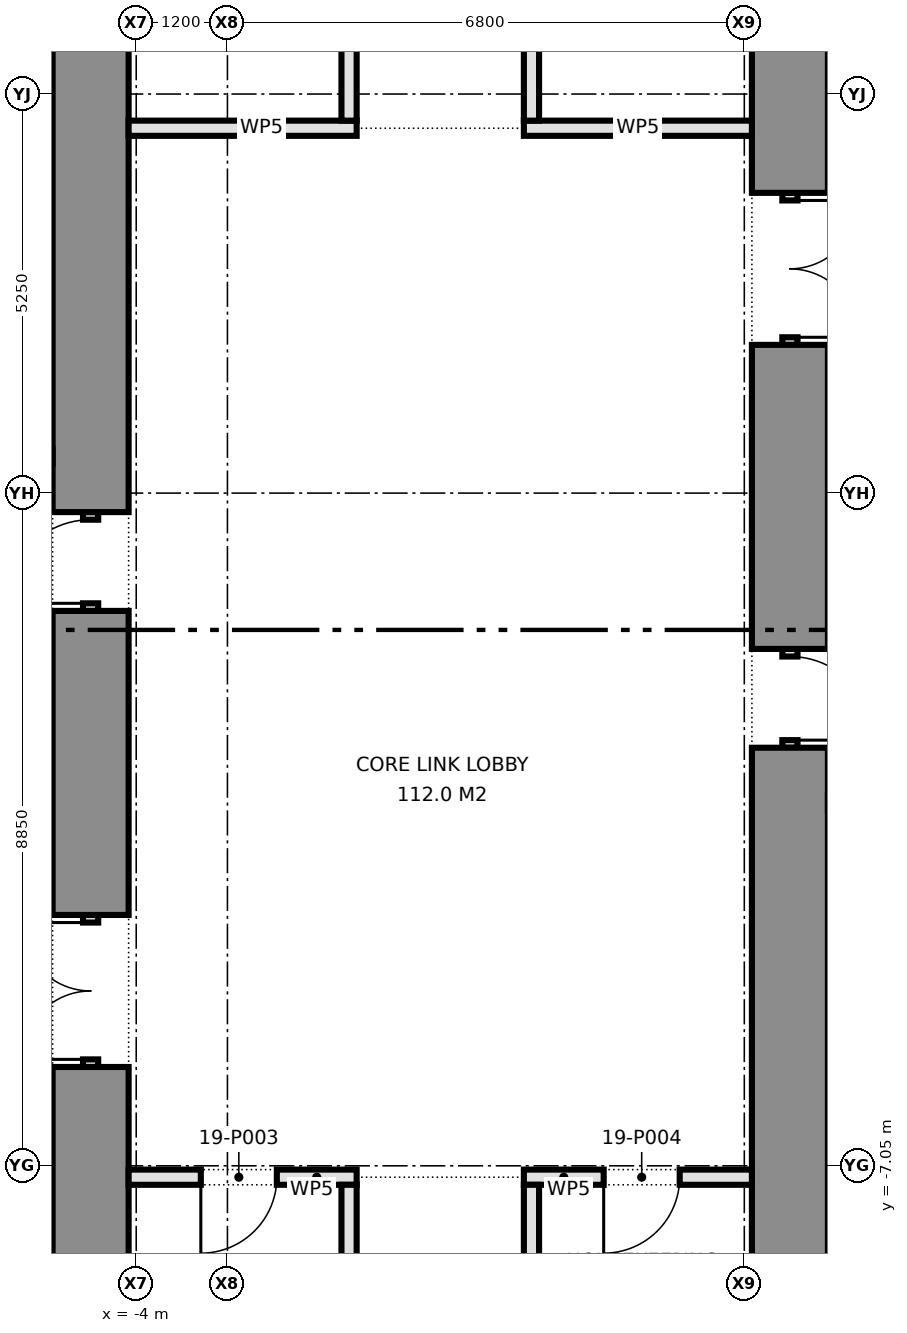
"""IFC4 building model, lengths in metres.
Left out: names, types, materials, properties, quantities, classifications, styles, units other than length and angle.
Written with IfcOpenShell. Run it as: python <this file> out.ifc"""

import sys

from ifc_helpers import new_model, si_unit, direction, frame, frame_2d, origin, place, context, subcontext, project, spatial, rectangle, extrude, element, fill, save


model = new_model("IFC4")
c1 = context("Model", 3, precision=1e-05, world=origin(), true_north=direction((0.0, 1.0)))
c2 = subcontext(c1, "Body", "Model", "MODEL_VIEW")
j1 = project(units=[si_unit("LENGTHUNIT", "METRE"), si_unit("PLANEANGLEUNIT", "RADIAN")], contexts=[c1])
p1 = place(None, origin())
s1 = spatial("IfcSite", under=j1, at=p1, CompositionType="ELEMENT")
p2 = place(p1, origin())
s2 = spatial("IfcBuilding", under=s1, at=p2, CompositionType="ELEMENT")
p3 = place(p2, frame((0.0, 0.0, 86.4)))
s3 = spatial("IfcBuildingStorey", under=s2, at=p3, CompositionType="ELEMENT", Elevation=86.4)
p4 = place(p3, frame((-4.6, -8.9, 0.0), z_axis=(0.0, 0.0, 1.0), x_axis=(0.0, 1.0, 0.0)))
e1 = element("IfcWall", 1, at=p4, inside=s3, PredefinedType="SHEAR", context=c2, shape_type="SweptSolid", body=[
    extrude(rectangle(XDim=3.15, YDim=1.0, at=frame_2d((1.575, 0.0))), origin(), (0.0, 0.0, 1.0), 4.2),
])
p5 = place(p3, frame((-4.6, -5.75, 0.0), z_axis=(0.0, 0.0, 1.0), x_axis=(0.0, 1.0, 0.0)))
e2 = element("IfcWall", 2, at=p5, inside=s3, PredefinedType="PARTITIONING", context=c2, shape_type="SweptSolid", body=[
    extrude(rectangle(XDim=2.0, YDim=0.2, at=frame_2d((1.0, 0.0))), origin(), (0.0, 0.0, 1.0), 2.4),
])
p6 = place(p5, frame((0.1, 0.0, 0.0)))
e3 = element("IfcOpeningElement", 3, at=p6, cuts=e2, PredefinedType="OPENING", context=c2, shape_type="SweptSolid", body=[
    extrude(rectangle(XDim=1.8, YDim=2.1, at=frame_2d((0.9, 1.05))), frame((0.0, 0.11, 0.0), z_axis=(0.0, -1.0, 0.0), x_axis=(1.0, 0.0, 0.0)), (0.0, 0.0, 1.0), 0.22),
])
p7 = place(p3, frame((-4.6, -3.75, 0.0), z_axis=(0.0, 0.0, 1.0), x_axis=(0.0, 1.0, 0.0)))
e4 = element("IfcWall", 4, at=p7, inside=s3, PredefinedType="SHEAR", context=c2, shape_type="SweptSolid", body=[
    extrude(rectangle(XDim=4.0, YDim=1.0, at=frame_2d((2.0, 0.0))), origin(), (0.0, 0.0, 1.0), 4.2),
])
p8 = place(p3, frame((-4.6, 0.25, 0.0), z_axis=(0.0, 0.0, 1.0), x_axis=(0.0, 1.0, 0.0)))
e5 = element("IfcWall", 5, at=p8, inside=s3, PredefinedType="PARTITIONING", context=c2, shape_type="SweptSolid", body=[
    extrude(rectangle(XDim=1.3, YDim=0.2, at=frame_2d((0.65, 0.0))), origin(), (0.0, 0.0, 1.0), 2.4),
])
p9 = place(p8, frame((0.1, 0.0, 0.0)))
e6 = element("IfcOpeningElement", 6, at=p9, cuts=e5, PredefinedType="OPENING", context=c2, shape_type="SweptSolid", body=[
    extrude(rectangle(XDim=1.1, YDim=2.1, at=frame_2d((0.55, 1.05))), frame((0.0, 0.11, 0.0), z_axis=(0.0, -1.0, 0.0), x_axis=(1.0, 0.0, 0.0)), (0.0, 0.0, 1.0), 0.22),
])
p10 = place(p3, frame((-4.6, 1.55, 0.0), z_axis=(0.0, 0.0, 1.0), x_axis=(0.0, 1.0, 0.0)))
e7 = element("IfcWall", 7, at=p10, inside=s3, PredefinedType="SHEAR", context=c2, shape_type="SweptSolid", body=[
    extrude(rectangle(XDim=7.35, YDim=1.0, at=frame_2d((3.675, 0.0))), origin(), (0.0, 0.0, 1.0), 4.2),
])
p11 = place(p3, frame((4.6, 8.9, 0.0), z_axis=(0.0, 0.0, 1.0), x_axis=(0.0, -1.0, 0.0)))
e8 = element("IfcWall", 8, at=p11, inside=s3, PredefinedType="SHEAR", context=c2, shape_type="SweptSolid", body=[
    extrude(rectangle(XDim=3.15, YDim=1.0, at=frame_2d((1.575, 0.0))), origin(), (0.0, 0.0, 1.0), 4.2),
])
p12 = place(p3, frame((4.6, 5.75, 0.0), z_axis=(0.0, 0.0, 1.0), x_axis=(0.0, -1.0, 0.0)))
e9 = element("IfcWall", 9, at=p12, inside=s3, PredefinedType="PARTITIONING", context=c2, shape_type="SweptSolid", body=[
    extrude(rectangle(XDim=2.0, YDim=0.2, at=frame_2d((1.0, 0.0))), origin(), (0.0, 0.0, 1.0), 2.4),
])
p13 = place(p12, frame((0.1, 0.0, 0.0)))
e10 = element("IfcOpeningElement", 10, at=p13, cuts=e9, PredefinedType="OPENING", context=c2, shape_type="SweptSolid", body=[
    extrude(rectangle(XDim=1.8, YDim=2.1, at=frame_2d((0.9, 1.05))), frame((0.0, 0.11, 0.0), z_axis=(0.0, -1.0, 0.0), x_axis=(1.0, 0.0, 0.0)), (0.0, 0.0, 1.0), 0.22),
])
p14 = place(p3, frame((4.6, 3.75, 0.0), z_axis=(0.0, 0.0, 1.0), x_axis=(0.0, -1.0, 0.0)))
e11 = element("IfcWall", 11, at=p14, inside=s3, PredefinedType="SHEAR", context=c2, shape_type="SweptSolid", body=[
    extrude(rectangle(XDim=4.0, YDim=1.0, at=frame_2d((2.0, 0.0))), origin(), (0.0, 0.0, 1.0), 4.2),
])
p15 = place(p3, frame((4.6, -0.25, 0.0), z_axis=(0.0, 0.0, 1.0), x_axis=(0.0, -1.0, 0.0)))
e12 = element("IfcWall", 12, at=p15, inside=s3, PredefinedType="PARTITIONING", context=c2, shape_type="SweptSolid", body=[
    extrude(rectangle(XDim=1.3, YDim=0.2, at=frame_2d((0.65, 0.0))), origin(), (0.0, 0.0, 1.0), 2.4),
])
p16 = place(p15, frame((0.1, 0.0, 0.0)))
e13 = element("IfcOpeningElement", 13, at=p16, cuts=e12, PredefinedType="OPENING", context=c2, shape_type="SweptSolid", body=[
    extrude(rectangle(XDim=1.1, YDim=2.1, at=frame_2d((0.55, 1.05))), frame((0.0, 0.11, 0.0), z_axis=(0.0, -1.0, 0.0), x_axis=(1.0, 0.0, 0.0)), (0.0, 0.0, 1.0), 0.22),
])
p17 = place(p3, frame((4.6, -1.55, 0.0), z_axis=(0.0, 0.0, 1.0), x_axis=(0.0, -1.0, 0.0)))
e14 = element("IfcWall", 14, at=p17, inside=s3, PredefinedType="SHEAR", context=c2, shape_type="SweptSolid", body=[
    extrude(rectangle(XDim=7.35, YDim=1.0, at=frame_2d((3.675, 0.0))), origin(), (0.0, 0.0, 1.0), 4.2),
])
p18 = place(p3, frame((-4.1, -7.2, 0.0), z_axis=(0.0, 0.0, 1.0), x_axis=(1.0, 0.0, 0.0)))
e15 = element("IfcWall", 15, at=p18, inside=s3, PredefinedType="PARTITIONING", context=c2, shape_type="SweptSolid", body=[
    extrude(rectangle(XDim=3.0, YDim=0.2, at=frame_2d((1.5, 0.0))), origin(), (0.0, 0.0, 1.0), 4.2),
])
p19 = place(p18, frame((0.95, 0.0, 0.0)))
e16 = element("IfcOpeningElement", 16, at=p19, cuts=e15, PredefinedType="OPENING", context=c2, shape_type="SweptSolid", body=[
    extrude(rectangle(XDim=1.0, YDim=2.1, at=frame_2d((0.5, 1.05))), frame((0.0, 0.11, 0.0), z_axis=(0.0, -1.0, 0.0), x_axis=(1.0, 0.0, 0.0)), (0.0, 0.0, 1.0), 0.22),
])
p20 = place(p3, frame((1.1, -7.2, 0.0), z_axis=(0.0, 0.0, 1.0), x_axis=(1.0, 0.0, 0.0)))
e17 = element("IfcWall", 17, at=p20, inside=s3, PredefinedType="PARTITIONING", context=c2, shape_type="SweptSolid", body=[
    extrude(rectangle(XDim=3.0, YDim=0.2, at=frame_2d((1.5, 0.0))), origin(), (0.0, 0.0, 1.0), 4.2),
])
p21 = place(p20, frame((1.05, 0.0, 0.0)))
e18 = element("IfcOpeningElement", 18, at=p21, cuts=e17, PredefinedType="OPENING", context=c2, shape_type="SweptSolid", body=[
    extrude(rectangle(XDim=1.0, YDim=2.1, at=frame_2d((0.5, 1.05))), frame((0.0, 0.11, 0.0), z_axis=(0.0, -1.0, 0.0), x_axis=(1.0, 0.0, 0.0)), (0.0, 0.0, 1.0), 0.22),
])
for number, where, z_axis, x_axis in (
    (19, (-4.1, 6.6, 0.0), (0.0, 0.0, 1.0), (1.0, 0.0, 0.0)),
    (20, (1.1, 6.6, 0.0), (0.0, 0.0, 1.0), (1.0, 0.0, 0.0)),
):
    element("IfcWall", number, at=place(p3, frame(where, z_axis=z_axis, x_axis=x_axis)), inside=s3, PredefinedType="PARTITIONING", context=c2, shape_type="SweptSolid", body=[
        extrude(rectangle(XDim=3.0, YDim=0.2, at=frame_2d((1.5, 0.0))), origin(), (0.0, 0.0, 1.0), 4.2),
    ])
p22 = place(p3, frame((1.2, -9.8, 0.0), z_axis=(0.0, 0.0, 1.0), x_axis=(0.0, 1.0, 0.0)))
e21 = element("IfcWall", 21, at=p22, inside=s3, PredefinedType="PARTITIONING", context=c2, shape_type="SweptSolid", body=[
    extrude(rectangle(XDim=2.5, YDim=0.2, at=frame_2d((1.25, 0.0))), origin(), (0.0, 0.0, 1.0), 4.2),
])
p23 = place(p3, frame((1.2, 6.7, 0.0), z_axis=(0.0, 0.0, 1.0), x_axis=(0.0, 1.0, 0.0)))
e22 = element("IfcWall", 22, at=p23, inside=s3, PredefinedType="PARTITIONING", context=c2, shape_type="SweptSolid", body=[
    extrude(rectangle(XDim=3.1, YDim=0.2, at=frame_2d((1.55, 0.0))), origin(), (0.0, 0.0, 1.0), 4.2),
])
p24 = place(p23, frame((1.05, 0.0, 0.0)))
e23 = element("IfcOpeningElement", 23, at=p24, cuts=e22, PredefinedType="OPENING", context=c2, shape_type="SweptSolid", body=[
    extrude(rectangle(XDim=1.0, YDim=2.1, at=frame_2d((0.5, 1.05))), frame((0.0, 0.11, 0.0), z_axis=(0.0, -1.0, 0.0), x_axis=(1.0, 0.0, 0.0)), (0.0, 0.0, 1.0), 0.22),
])
p25 = place(p3, frame((-1.2, -9.8, 0.0), z_axis=(0.0, 0.0, 1.0), x_axis=(0.0, 1.0, 0.0)))
e24 = element("IfcWall", 24, at=p25, inside=s3, PredefinedType="PARTITIONING", context=c2, shape_type="SweptSolid", body=[
    extrude(rectangle(XDim=2.5, YDim=0.2, at=frame_2d((1.25, 0.0))), origin(), (0.0, 0.0, 1.0), 4.2),
])
p26 = place(p3, frame((-1.2, 6.7, 0.0), z_axis=(0.0, 0.0, 1.0), x_axis=(0.0, 1.0, 0.0)))
e25 = element("IfcWall", 25, at=p26, inside=s3, PredefinedType="PARTITIONING", context=c2, shape_type="SweptSolid", body=[
    extrude(rectangle(XDim=3.1, YDim=0.2, at=frame_2d((1.55, 0.0))), origin(), (0.0, 0.0, 1.0), 4.2),
])
p27 = place(p26, frame((1.05, 0.0, 0.0)))
e26 = element("IfcOpeningElement", 26, at=p27, cuts=e25, PredefinedType="OPENING", context=c2, shape_type="SweptSolid", body=[
    extrude(rectangle(XDim=1.0, YDim=2.1, at=frame_2d((0.5, 1.05))), frame((0.0, 0.11, 0.0), z_axis=(0.0, -1.0, 0.0), x_axis=(1.0, 0.0, 0.0)), (0.0, 0.0, 1.0), 0.22),
])
p28 = place(p6, origin())
e27 = element("IfcDoor", 27, at=p28, inside=s3, OperationType="DOUBLE_DOOR_SINGLE_SWING", PredefinedType="DOOR", context=c2, shape_type="SweptSolid", body=[
    extrude(rectangle(XDim=1.8, YDim=2.1, at=frame_2d((0.9, 1.05))), frame((0.0, 0.025, 0.0), z_axis=(0.0, -1.0, 0.0), x_axis=(1.0, 0.0, 0.0)), (0.0, 0.0, 1.0), 0.05),
])
fill(e3, e27)
p29 = place(p9, origin())
e28 = element("IfcDoor", 28, at=p29, inside=s3, OperationType="SINGLE_SWING_LEFT", PredefinedType="DOOR", context=c2, shape_type="SweptSolid", body=[
    extrude(rectangle(XDim=1.1, YDim=2.1, at=frame_2d((0.55, 1.05))), frame((0.0, 0.025, 0.0), z_axis=(0.0, -1.0, 0.0), x_axis=(1.0, 0.0, 0.0)), (0.0, 0.0, 1.0), 0.05),
])
fill(e6, e28)
p30 = place(p13, origin())
e29 = element("IfcDoor", 29, at=p30, inside=s3, OperationType="DOUBLE_DOOR_SINGLE_SWING", PredefinedType="DOOR", context=c2, shape_type="SweptSolid", body=[
    extrude(rectangle(XDim=1.8, YDim=2.1, at=frame_2d((0.9, 1.05))), frame((0.0, 0.025, 0.0), z_axis=(0.0, -1.0, 0.0), x_axis=(1.0, 0.0, 0.0)), (0.0, 0.0, 1.0), 0.05),
])
fill(e10, e29)
p31 = place(p16, origin())
e30 = element("IfcDoor", 30, at=p31, inside=s3, OperationType="SINGLE_SWING_RIGHT", PredefinedType="DOOR", context=c2, shape_type="SweptSolid", body=[
    extrude(rectangle(XDim=1.1, YDim=2.1, at=frame_2d((0.55, 1.05))), frame((0.0, 0.025, 0.0), z_axis=(0.0, -1.0, 0.0), x_axis=(1.0, 0.0, 0.0)), (0.0, 0.0, 1.0), 0.05),
])
fill(e13, e30)
p32 = place(p19, frame((1.0, 0.0, 0.0), z_axis=(0.0, 0.0, 1.0), x_axis=(-1.0, 0.0, 0.0)))
e31 = element("IfcDoor", 31, at=p32, inside=s3, OperationType="SINGLE_SWING_RIGHT", PredefinedType="DOOR", context=c2, shape_type="SweptSolid", body=[
    extrude(rectangle(XDim=1.0, YDim=2.1, at=frame_2d((0.5, 1.05))), frame((0.0, 0.025, 0.0), z_axis=(0.0, -1.0, 0.0), x_axis=(1.0, 0.0, 0.0)), (0.0, 0.0, 1.0), 0.05),
])
fill(e16, e31)
p33 = place(p21, frame((1.0, 0.0, 0.0), z_axis=(0.0, 0.0, 1.0), x_axis=(-1.0, 0.0, 0.0)))
e32 = element("IfcDoor", 32, at=p33, inside=s3, OperationType="SINGLE_SWING_RIGHT", PredefinedType="DOOR", context=c2, shape_type="SweptSolid", body=[
    extrude(rectangle(XDim=1.0, YDim=2.1, at=frame_2d((0.5, 1.05))), frame((0.0, 0.025, 0.0), z_axis=(0.0, -1.0, 0.0), x_axis=(1.0, 0.0, 0.0)), (0.0, 0.0, 1.0), 0.05),
])
fill(e18, e32)
save(model, sys.argv[1])
